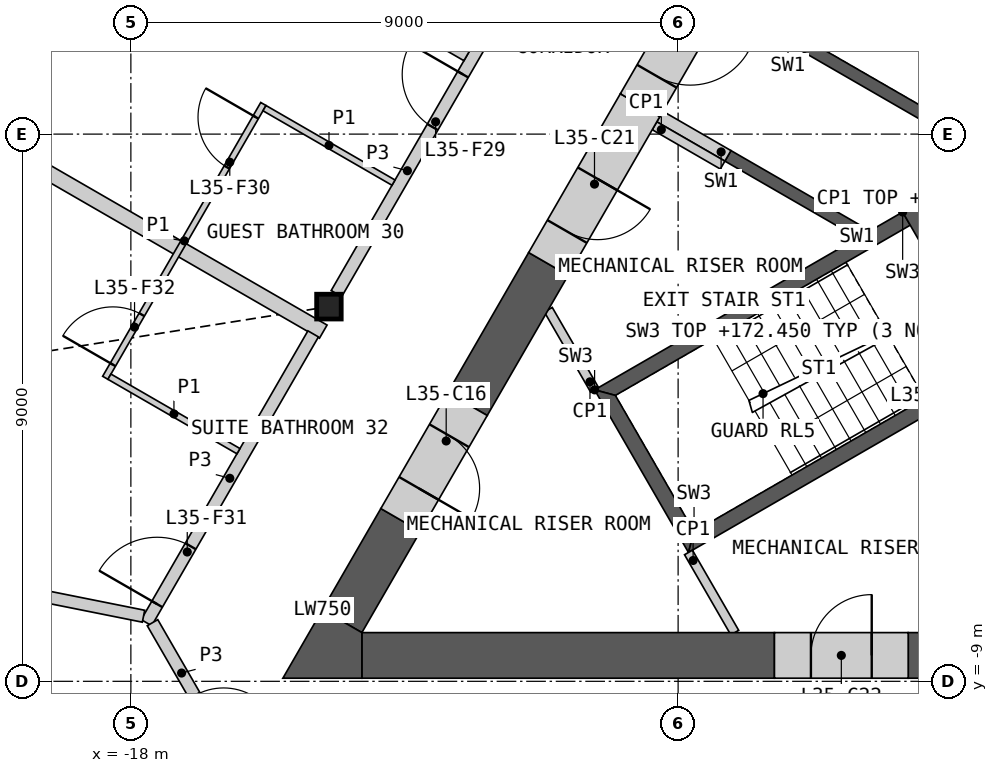
"""IFC4 building model, lengths in metres.
Left out: names, types, materials, properties, quantities, classifications, styles, units other than length and angle.
Written with IfcOpenShell. Run it as: python <this file> out.ifc"""

import sys

from ifc_helpers import new_model, si_unit, direction, frame, frame_2d, origin, origin_2d, place, context, subcontext, project, spatial, polyline, rectangle, i_section, outline, extrude, element, fill, save


model = new_model("IFC4")
c1 = context("Model", 3, precision=1e-05, world=origin(), true_north=direction((0.0, 1.0)))
c2 = subcontext(c1, "Body", "Model", "MODEL_VIEW")
j1 = project(units=[si_unit("LENGTHUNIT", "METRE"), si_unit("PLANEANGLEUNIT", "RADIAN")], contexts=[c1])
p1 = place(None, origin())
s1 = spatial("IfcSite", under=j1, at=p1, CompositionType="ELEMENT")
p2 = place(p1, origin())
s2 = spatial("IfcBuilding", under=s1, at=p2, CompositionType="ELEMENT")
p3 = place(p2, frame((0.0, 0.0, 169.2)))
s3 = spatial("IfcBuildingStorey", under=s2, at=p3, CompositionType="ELEMENT", Elevation=169.2)
p4 = place(p3, frame((-14.743, -2.837, 0.0), z_axis=(0.0, 0.0, 1.0), x_axis=(1.0, 0.0, 0.0)))
e1 = element("IfcColumn", 1, at=p4, inside=s3, PredefinedType="COLUMN", context=c2, shape_type="SweptSolid", body=[
    extrude(i_section(OverallWidth=0.404, OverallDepth=0.407, WebThickness=0.027, FlangeThickness=0.044, at=origin_2d()), origin(), (0.0, 0.0, 1.0), 3.6),
])
p5 = place(p3, origin())
e2 = element("IfcWall", 2, at=p5, inside=s3, PredefinedType="SHEAR", context=c2, shape_type="SweptSolid", body=[
    extrude(outline(polyline([(-6.061, -1.697), (-8.231, -0.444), (-8.131, -0.271), (-5.96, -1.524), (-6.061, -1.697)])), origin(), (0.0, 0.0, 1.0), 3.25),
])
p6 = place(p3, origin())
e3 = element("IfcWall", 3, at=p6, inside=s3, PredefinedType="SHEAR", context=c2, shape_type="SweptSolid", body=[
    extrude(outline(polyline([(-4.96, 0.208), (-7.131, 1.461), (-3.731, 7.35), (-1.561, 6.097), (-1.66, 5.924), (-3.652, 7.074), (-4.652, 5.342), (-2.66, 4.192), (-2.76, 4.019), (-4.752, 5.169), (-5.752, 3.437), (-3.76, 2.287), (-3.861, 2.113), (-5.852, 3.263), (-6.852, 1.531), (-4.861, 0.381), (-4.96, 0.208)])), origin(), (0.0, 0.0, 1.0), 3.25),
])
p7 = place(p3, frame((-8.181, -0.357, 0.0), z_axis=(0.0, 0.0, 1.0), x_axis=(-0.866003189247, 0.500038474733, 0.0)))
e4 = element("IfcWall", 4, at=p7, inside=s3, PredefinedType="SHEAR", context=c2, shape_type="SweptSolid", body=[
    extrude(rectangle(XDim=1.293, YDim=0.2, at=frame_2d((0.646, 0.0))), origin(), (0.0, 0.0, 1.0), 3.25),
])
p8 = place(p3, origin())
e5 = element("IfcWall", 5, at=p8, inside=s3, PredefinedType="SHEAR", context=c2, shape_type="SweptSolid", body=[
    extrude(outline(polyline([(-5.307, -1.281), (-10.374, -4.206), (-10.032, -4.298), (-5.182, -1.498), (-5.307, -1.281)])), origin(), (0.0, 0.0, 1.0), 3.25),
])
p9 = place(p3, origin())
e6 = element("IfcWall", 6, at=p9, inside=s3, PredefinedType="SHEAR", context=c2, shape_type="SweptSolid", body=[
    extrude(outline(polyline([(-10.374, -4.206), (-8.83, -6.881), (-8.738, -6.539), (-10.032, -4.298), (-10.374, -4.206)])), origin(), (0.0, 0.0, 1.0), 3.25),
])
p10 = place(p3, origin())
e7 = element("IfcWall", 7, at=p10, inside=s3, PredefinedType="SHEAR", context=c2, shape_type="SweptSolid", body=[
    extrude(outline(polyline([(-8.738, -6.539), (-8.83, -6.881), (-3.763, -3.956), (-3.888, -3.739), (-8.738, -6.539)])), origin(), (0.0, 0.0, 1.0), 3.25),
])
p11 = place(p3, frame((-5.199, -1.219, 0.0), z_axis=(0.0, 0.0, 1.0), x_axis=(0.499982516597, -0.866035497597, 0.0)))
e8 = element("IfcWall", 8, at=p11, inside=s3, PredefinedType="SHEAR", context=c2, shape_type="SweptSolid", body=[
    extrude(rectangle(XDim=3.088, YDim=0.25, at=frame_2d((1.544, 0.0))), origin(), (0.0, 0.0, 1.0), 3.25),
])
p12 = place(p11, frame((0.994, 0.0, 0.0)))
e9 = element("IfcOpeningElement", 9, at=p12, cuts=e8, PredefinedType="OPENING", context=c2, shape_type="SweptSolid", body=[
    extrude(rectangle(XDim=1.1, YDim=2.1, at=frame_2d((0.55, 1.05))), frame((0.0, 0.135, 0.0), z_axis=(0.0, -1.0, 0.0), x_axis=(1.0, 0.0, 0.0)), (0.0, 0.0, 1.0), 0.27),
])
p13 = place(p3, frame((-8.268, -0.509, 0.0), z_axis=(0.0, 0.0, 1.0), x_axis=(-0.866003189247, 0.500038474733, 0.0)))
e10 = element("IfcWall", 10, at=p13, inside=s3, PredefinedType="PARTITIONING", context=c2, shape_type="SweptSolid", body=[
    extrude(rectangle(XDim=1.293, YDim=0.15, at=frame_2d((0.646, 0.0))), origin(), (0.0, 0.0, 1.0), 3.25),
])
for number, where, z_axis, x_axis in (
    (11, (-8.83, -6.881, 0.0), (0.0, 0.0, 1.0), (0.5, -0.866, 0.0)),
    (12, (-10.374, -4.206, 0.0), (0.0, 0.0, 1.0), (-0.5, 0.866, 0.0)),
):
    element("IfcWall", number, at=place(p3, frame(where, z_axis=z_axis, x_axis=x_axis)), inside=s3, PredefinedType="PARTITIONING", context=c2, shape_type="SweptSolid", body=[
        extrude(rectangle(XDim=1.522, YDim=0.15, at=frame_2d((0.761, 0.0))), origin(), (0.0, 0.0, 1.0), 3.25),
    ])
p14 = place(p3, frame((-14.201, -8.574, 0.0), z_axis=(0.0, 0.0, 1.0), x_axis=(1.0, 0.0, 0.0)))
e13 = element("IfcWall", 13, at=p14, inside=s3, PredefinedType="SHEAR", context=c2, shape_type="SweptSolid", body=[
    extrude(rectangle(XDim=6.785, YDim=0.75, at=frame_2d((3.393, 0.0))), origin(), (0.0, 0.0, 1.0), 3.25),
])
p15 = place(p3, frame((-5.216, -8.574, 0.0), z_axis=(0.0, 0.0, 1.0), x_axis=(1.0, 0.0, 0.0)))
e14 = element("IfcWall", 14, at=p15, inside=s3, PredefinedType="SHEAR", context=c2, shape_type="SweptSolid", body=[
    extrude(rectangle(XDim=1.816, YDim=0.75, at=frame_2d((0.908, 0.0))), origin(), (0.0, 0.0, 1.0), 3.25),
])
p16 = place(p3, frame((-11.133, -2.135, 0.0), z_axis=(0.0, 0.0, 1.0), x_axis=(-0.499936812382, -0.866061882099, 0.0)))
e15 = element("IfcWall", 15, at=p16, inside=s3, PredefinedType="SHEAR", context=c2, shape_type="SweptSolid", body=[
    extrude(rectangle(XDim=2.662, YDim=0.75, at=frame_2d((1.331, 0.0))), origin(), (0.0, 0.0, 1.0), 3.25),
])
p17 = place(p3, frame((-13.564, -6.346, 0.0), z_axis=(0.0, 0.0, 1.0), x_axis=(-0.499989888488, -0.86603124159, 0.0)))
e16 = element("IfcWall", 16, at=p17, inside=s3, PredefinedType="SHEAR", context=c2, shape_type="SweptSolid", body=[
    extrude(rectangle(XDim=1.923, YDim=0.75, at=frame_2d((0.961, 0.0))), origin(), (0.0, 0.0, 1.0), 3.25),
])
p18 = place(p3, origin())
e17 = element("IfcWall", 17, at=p18, inside=s3, PredefinedType="SHEAR", context=c2, shape_type="SweptSolid", body=[
    extrude(outline(polyline([(-14.851, -7.824), (-14.201, -8.199), (-14.201, -8.949), (-15.5, -8.949), (-14.851, -7.824)])), origin(), (0.0, 0.0, 1.0), 3.25),
])
p19 = place(p3, frame((-12.464, -4.441, 0.0), z_axis=(0.0, 0.0, 1.0), x_axis=(-0.499994660107, -0.866028486751, 0.0)))
e18 = element("IfcWall", 18, at=p19, inside=s3, PredefinedType="SHEAR", context=c2, shape_type="SweptSolid", body=[
    extrude(rectangle(XDim=2.2, YDim=0.75, at=frame_2d((1.1, 0.0))), origin(), (0.0, 0.0, 1.0), 3.25),
])
p20 = place(p19, frame((0.6, 0.0, 0.0)))
e19 = element("IfcOpeningElement", 19, at=p20, cuts=e18, PredefinedType="OPENING", context=c2, shape_type="SweptSolid", body=[
    extrude(rectangle(XDim=1.0, YDim=2.1, at=frame_2d((0.5, 1.05))), frame((0.0, 0.385, 0.0), z_axis=(0.0, -1.0, 0.0), x_axis=(1.0, 0.0, 0.0)), (0.0, 0.0, 1.0), 0.77),
])
p21 = place(p3, frame((-9.625, 0.477, 0.0), z_axis=(0.0, 0.0, 1.0), x_axis=(-0.499995718215, -0.86602787586, 0.0)))
e20 = element("IfcWall", 20, at=p21, inside=s3, PredefinedType="SHEAR", context=c2, shape_type="SweptSolid", body=[
    extrude(rectangle(XDim=3.016, YDim=0.75, at=frame_2d((1.508, 0.0))), origin(), (0.0, 0.0, 1.0), 3.25),
])
p22 = place(p21, frame((1.4, 0.0, 0.0)))
e21 = element("IfcOpeningElement", 21, at=p22, cuts=e20, PredefinedType="OPENING", context=c2, shape_type="SweptSolid", body=[
    extrude(rectangle(XDim=1.0, YDim=2.1, at=frame_2d((0.5, 1.05))), frame((0.0, 0.385, 0.0), z_axis=(0.0, -1.0, 0.0), x_axis=(1.0, 0.0, 0.0)), (0.0, 0.0, 1.0), 0.77),
])
p23 = place(p3, frame((-7.416, -8.574, 0.0), z_axis=(0.0, 0.0, 1.0), x_axis=(1.0, 0.0, 0.0)))
e22 = element("IfcWall", 22, at=p23, inside=s3, PredefinedType="SHEAR", context=c2, shape_type="SweptSolid", body=[
    extrude(rectangle(XDim=2.2, YDim=0.75, at=frame_2d((1.1, 0.0))), origin(), (0.0, 0.0, 1.0), 3.25),
])
p24 = place(p23, frame((0.6, 0.0, 0.0)))
e23 = element("IfcOpeningElement", 23, at=p24, cuts=e22, PredefinedType="OPENING", context=c2, shape_type="SweptSolid", body=[
    extrude(rectangle(XDim=1.0, YDim=2.1, at=frame_2d((0.5, 1.05))), frame((0.0, 0.385, 0.0), z_axis=(0.0, -1.0, 0.0), x_axis=(1.0, 0.0, 0.0)), (0.0, 0.0, 1.0), 0.77),
])
p25 = place(p3, frame((-8.525, 2.382, 0.0), z_axis=(0.0, 0.0, 1.0), x_axis=(-0.500077893725, -0.86598042715, 0.0)))
e24 = element("IfcWall", 24, at=p25, inside=s3, PredefinedType="SHEAR", context=c2, shape_type="SweptSolid", body=[
    extrude(rectangle(XDim=2.2, YDim=0.75, at=frame_2d((1.1, 0.0))), origin(), (0.0, 0.0, 1.0), 3.25),
])
p26 = place(p25, frame((0.55, 0.0, 0.0)))
e25 = element("IfcOpeningElement", 25, at=p26, cuts=e24, PredefinedType="OPENING", context=c2, shape_type="SweptSolid", body=[
    extrude(rectangle(XDim=1.1, YDim=2.1, at=frame_2d((0.55, 1.05))), frame((0.0, 0.385, 0.0), z_axis=(0.0, -1.0, 0.0), x_axis=(1.0, 0.0, 0.0)), (0.0, 0.0, 1.0), 0.77),
])
p27 = place(p3, frame((-26.164, 3.292, 0.0), z_axis=(0.0, 0.0, 1.0), x_axis=(0.866022412254, -0.500005181446, 0.0)))
e26 = element("IfcWall", 26, at=p27, inside=s3, PredefinedType="PARTITIONING", context=c2, shape_type="SweptSolid", body=[
    extrude(rectangle(XDim=13.081, YDim=0.25, at=frame_2d((6.541, 0.0))), origin(), (0.0, 0.0, 1.0), 2.404),
])
p28 = place(p3, frame((-14.619, -2.624, 0.0), z_axis=(0.0, 0.0, 1.0), x_axis=(0.50000393355, 0.866023132736, 0.0)))
e27 = element("IfcWall", 27, at=p28, inside=s3, PredefinedType="PARTITIONING", context=c2, shape_type="SweptSolid", body=[
    extrude(rectangle(XDim=9.335, YDim=0.2, at=frame_2d((4.667, 0.0))), origin(), (0.0, 0.0, 1.0), 3.25),
])
p29 = place(p28, frame((3.163, 0.0, 0.0)))
e28 = element("IfcOpeningElement", 28, at=p29, cuts=e27, PredefinedType="OPENING", context=c2, shape_type="SweptSolid", body=[
    extrude(rectangle(XDim=1.0, YDim=2.1, at=frame_2d((0.5, 1.05))), frame((0.0, 0.11, 0.0), z_axis=(0.0, -1.0, 0.0), x_axis=(1.0, 0.0, 0.0)), (0.0, 0.0, 1.0), 0.22),
])
p30 = place(p3, frame((-17.744, -8.035, 0.0), z_axis=(0.0, 0.0, 1.0), x_axis=(0.500007607708, 0.866021011428, 0.0)))
e29 = element("IfcWall", 29, at=p30, inside=s3, PredefinedType="PARTITIONING", context=c2, shape_type="SweptSolid", body=[
    extrude(rectangle(XDim=5.484, YDim=0.2, at=frame_2d((2.742, 0.0))), origin(), (0.0, 0.0, 1.0), 3.25),
])
p31 = place(p30, frame((0.352, 0.0, 0.0)))
e30 = element("IfcOpeningElement", 30, at=p31, cuts=e29, PredefinedType="OPENING", context=c2, shape_type="SweptSolid", body=[
    extrude(rectangle(XDim=1.1, YDim=2.1, at=frame_2d((0.55, 1.05))), frame((0.0, 0.11, 0.0), z_axis=(0.0, -1.0, 0.0), x_axis=(1.0, 0.0, 0.0)), (0.0, 0.0, 1.0), 0.22),
])
p32 = place(p3, frame((-17.644, -8.035, 0.0), z_axis=(0.0, 0.0, 1.0), x_axis=(0.499961815444, -0.866047448526, 0.0)))
e31 = element("IfcWall", 31, at=p32, inside=s3, PredefinedType="PARTITIONING", context=c2, shape_type="SweptSolid", body=[
    extrude(rectangle(XDim=3.826, YDim=0.2, at=frame_2d((1.913, 0.0))), origin(), (0.0, 0.0, 1.0), 3.25),
])
p33 = place(p32, frame((1.386, 0.0, 0.0)))
e32 = element("IfcOpeningElement", 32, at=p33, cuts=e31, PredefinedType="OPENING", context=c2, shape_type="SweptSolid", body=[
    extrude(rectangle(XDim=0.95, YDim=2.1, at=frame_2d((0.475, 1.05))), frame((0.0, 0.11, 0.0), z_axis=(0.0, -1.0, 0.0), x_axis=(1.0, 0.0, 0.0)), (0.0, 0.0, 1.0), 0.22),
])
p34 = place(p3, frame((-31.329, -5.221, 0.0), z_axis=(0.0, 0.0, 1.0), x_axis=(0.980565709097, -0.196190953266, 0.0)))
e33 = element("IfcWall", 33, at=p34, inside=s3, PredefinedType="PARTITIONING", context=c2, shape_type="SweptSolid", body=[
    extrude(rectangle(XDim=13.805, YDim=0.2, at=frame_2d((6.903, 0.0))), origin(), (0.0, 0.0, 1.0), 2.404),
])
p35 = place(p3, frame((-22.363, -7.862, 0.0), z_axis=(0.0, 0.0, 1.0), x_axis=(0.500009728207, -0.866019787128, 0.0)))
e34 = element("IfcWall", 34, at=p35, inside=s3, PredefinedType="PARTITIONING", context=c2, shape_type="SweptSolid", body=[
    extrude(rectangle(XDim=11.967, YDim=0.2, at=frame_2d((5.983, 0.0))), origin(), (0.0, 0.0, 1.0), 2.404),
])
p36 = place(p35, frame((5.658, 0.0, 0.0)))
e35 = element("IfcOpeningElement", 35, at=p36, cuts=e34, PredefinedType="OPENING", context=c2, shape_type="SweptSolid", body=[
    extrude(rectangle(XDim=0.95, YDim=2.1, at=frame_2d((0.475, 1.05))), frame((0.0, 0.11, 0.0), z_axis=(0.0, -1.0, 0.0), x_axis=(1.0, 0.0, 0.0)), (0.0, 0.0, 1.0), 0.22),
])
p37 = place(p3, frame((-19.555, 5.383, 0.0), z_axis=(0.0, 0.0, 1.0), x_axis=(0.866027979776, -0.499995538225, 0.0)))
e36 = element("IfcWall", 36, at=p37, inside=s3, PredefinedType="PARTITIONING", context=c2, shape_type="SweptSolid", body=[
    extrude(rectangle(XDim=8.177, YDim=0.2, at=frame_2d((4.089, 0.0))), origin(), (0.0, 0.0, 1.0), 2.404),
])
p38 = place(p3, frame((-18.421, -4.008, 0.0), z_axis=(0.0, 0.0, 1.0), x_axis=(0.500006934395, 0.866021400173, 0.0)))
e37 = element("IfcWall", 37, at=p38, inside=s3, PredefinedType="PARTITIONING", context=c2, shape_type="SweptSolid", body=[
    extrude(rectangle(XDim=5.2, YDim=0.1, at=frame_2d((2.6, 0.0))), origin(), (0.0, 0.0, 1.0), 2.404),
])
p39 = place(p38, frame((4.0, 0.0, 0.0)))
e38 = element("IfcOpeningElement", 38, at=p39, cuts=e37, PredefinedType="OPENING", context=c2, shape_type="SweptSolid", body=[
    extrude(rectangle(XDim=0.95, YDim=2.1, at=frame_2d((0.475, 1.05))), frame((0.0, 0.06, 0.0), z_axis=(0.0, -1.0, 0.0), x_axis=(1.0, 0.0, 0.0)), (0.0, 0.0, 1.0), 0.12),
])
p40 = place(p38, frame((0.25, 0.0, 0.0)))
e39 = element("IfcOpeningElement", 39, at=p40, cuts=e37, PredefinedType="OPENING", context=c2, shape_type="SweptSolid", body=[
    extrude(rectangle(XDim=0.95, YDim=2.1, at=frame_2d((0.475, 1.05))), frame((0.0, 0.06, 0.0), z_axis=(0.0, -1.0, 0.0), x_axis=(1.0, 0.0, 0.0)), (0.0, 0.0, 1.0), 0.12),
])
p41 = place(p3, frame((-18.353, -3.99, 0.0), z_axis=(0.0, 0.0, 1.0), x_axis=(0.866057815567, -0.499943856944, 0.0)))
e40 = element("IfcWall", 40, at=p41, inside=s3, PredefinedType="PARTITIONING", context=c2, shape_type="SweptSolid", body=[
    extrude(rectangle(XDim=2.45, YDim=0.1, at=frame_2d((1.225, 0.0))), origin(), (0.0, 0.0, 1.0), 2.404),
])
p42 = place(p3, frame((-15.802, 0.427, 0.0), z_axis=(0.0, 0.0, 1.0), x_axis=(0.866032905446, -0.499987006516, 0.0)))
e41 = element("IfcWall", 41, at=p42, inside=s3, PredefinedType="PARTITIONING", context=c2, shape_type="SweptSolid", body=[
    extrude(rectangle(XDim=2.45, YDim=0.1, at=frame_2d((1.225, 0.0))), origin(), (0.0, 0.0, 1.0), 2.404),
])
p43 = place(p20, origin())
e42 = element("IfcDoor", 42, at=p43, inside=s3, OperationType="SINGLE_SWING_RIGHT", PredefinedType="DOOR", context=c2, shape_type="SweptSolid", body=[
    extrude(rectangle(XDim=1.0, YDim=2.1, at=frame_2d((0.5, 1.05))), frame((0.0, 0.13, 0.0), z_axis=(0.0, -1.0, 0.0), x_axis=(1.0, 0.0, 0.0)), (0.0, 0.0, 1.0), 0.05),
])
fill(e19, e42)
p44 = place(p22, origin())
e43 = element("IfcDoor", 43, at=p44, inside=s3, OperationType="SINGLE_SWING_LEFT", PredefinedType="DOOR", context=c2, shape_type="SweptSolid", body=[
    extrude(rectangle(XDim=1.0, YDim=2.1, at=frame_2d((0.5, 1.05))), frame((0.0, 0.13, 0.0), z_axis=(0.0, -1.0, 0.0), x_axis=(1.0, 0.0, 0.0)), (0.0, 0.0, 1.0), 0.05),
])
fill(e21, e43)
p45 = place(p24, origin())
e44 = element("IfcDoor", 44, at=p45, inside=s3, OperationType="SINGLE_SWING_RIGHT", PredefinedType="DOOR", context=c2, shape_type="SweptSolid", body=[
    extrude(rectangle(XDim=1.0, YDim=2.1, at=frame_2d((0.5, 1.05))), frame((0.0, 0.13, 0.0), z_axis=(0.0, -1.0, 0.0), x_axis=(1.0, 0.0, 0.0)), (0.0, 0.0, 1.0), 0.05),
])
fill(e23, e44)
p46 = place(p26, origin())
e45 = element("IfcDoor", 45, at=p46, inside=s3, OperationType="SINGLE_SWING_LEFT", PredefinedType="DOOR", context=c2, shape_type="SweptSolid", body=[
    extrude(rectangle(XDim=1.1, YDim=2.1, at=frame_2d((0.55, 1.05))), frame((0.0, 0.13, 0.0), z_axis=(0.0, -1.0, 0.0), x_axis=(1.0, 0.0, 0.0)), (0.0, 0.0, 1.0), 0.05),
])
fill(e25, e45)
p47 = place(p29, origin())
e46 = element("IfcDoor", 46, at=p47, inside=s3, OperationType="SINGLE_SWING_RIGHT", PredefinedType="DOOR", context=c2, shape_type="SweptSolid", body=[
    extrude(rectangle(XDim=1.0, YDim=2.1, at=frame_2d((0.5, 1.05))), frame((0.0, 0.025, 0.0), z_axis=(0.0, -1.0, 0.0), x_axis=(1.0, 0.0, 0.0)), (0.0, 0.0, 1.0), 0.05),
])
fill(e28, e46)
p48 = place(p39, origin())
e47 = element("IfcDoor", 47, at=p48, inside=s3, OperationType="SINGLE_SWING_RIGHT", PredefinedType="DOOR", context=c2, shape_type="SweptSolid", body=[
    extrude(rectangle(XDim=0.95, YDim=2.1, at=frame_2d((0.475, 1.05))), frame((0.0, 0.025, 0.0), z_axis=(0.0, -1.0, 0.0), x_axis=(1.0, 0.0, 0.0)), (0.0, 0.0, 1.0), 0.05),
])
fill(e38, e47)
p49 = place(p31, origin())
e48 = element("IfcDoor", 48, at=p49, inside=s3, OperationType="SINGLE_SWING_LEFT", PredefinedType="DOOR", context=c2, shape_type="SweptSolid", body=[
    extrude(rectangle(XDim=1.1, YDim=2.1, at=frame_2d((0.55, 1.05))), frame((0.0, 0.025, 0.0), z_axis=(0.0, -1.0, 0.0), x_axis=(1.0, 0.0, 0.0)), (0.0, 0.0, 1.0), 0.05),
])
fill(e30, e48)
p50 = place(p40, origin())
e49 = element("IfcDoor", 49, at=p50, inside=s3, OperationType="SINGLE_SWING_LEFT", PredefinedType="DOOR", context=c2, shape_type="SweptSolid", body=[
    extrude(rectangle(XDim=0.95, YDim=2.1, at=frame_2d((0.475, 1.05))), frame((0.0, 0.025, 0.0), z_axis=(0.0, -1.0, 0.0), x_axis=(1.0, 0.0, 0.0)), (0.0, 0.0, 1.0), 0.05),
])
fill(e39, e49)
save(model, sys.argv[1])
